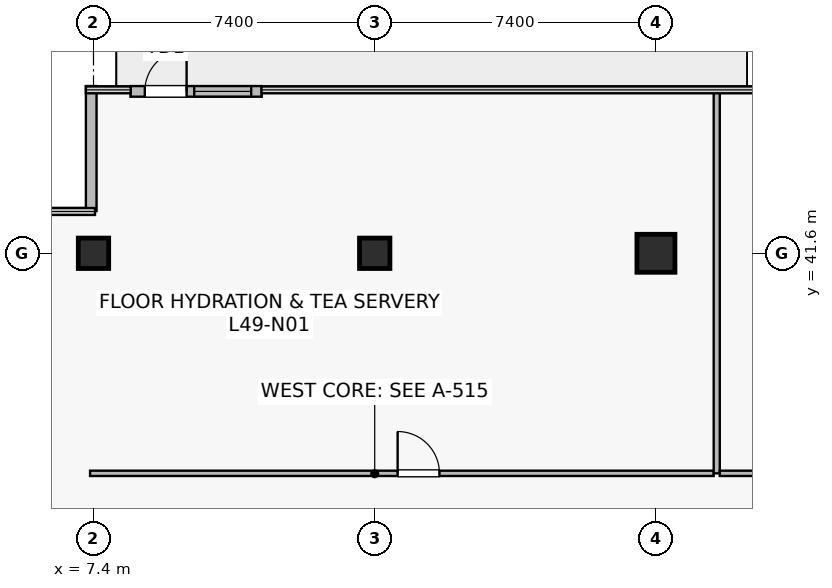
"""IFC4 building model, lengths in metres.
Left out: names, types, materials, properties, quantities, classifications, styles, units other than length and angle.
Written with IfcOpenShell. Run it as: python <this file> out.ifc"""

import sys

from ifc_helpers import new_model, si_unit, direction, frame, frame_2d, origin, origin_2d, place, context, subcontext, project, spatial, rectangle, extrude, source, transform, mapped, element, fill, save


model = new_model("IFC4")
c1 = context("Model", 3, precision=1e-05, world=origin(), true_north=direction((0.0, 1.0)))
c2 = subcontext(c1, "Body", "Model", "MODEL_VIEW")
j1 = project(units=[si_unit("LENGTHUNIT", "METRE"), si_unit("PLANEANGLEUNIT", "RADIAN")], contexts=[c1])
p1 = place(None, origin())
s1 = spatial("IfcSite", under=j1, at=p1, CompositionType="ELEMENT")
p2 = place(p1, origin())
s2 = spatial("IfcBuilding", under=s1, at=p2, CompositionType="ELEMENT")
p3 = place(p2, frame((0.0, 0.0, 205.5)))
s3 = spatial("IfcBuildingStorey", under=s2, at=p3, CompositionType="ELEMENT", Elevation=205.5)
m1 = source(origin(), c2, "Body", "SweptSolid", [
    extrude(rectangle(XDim=0.8, YDim=0.8, at=origin_2d()), origin(), (0.0, 0.0, 1.0), 4.1),
])
p4 = place(p3, frame((14.8, 41.6, 0.0), z_axis=(0.0, 0.0, 1.0), x_axis=(1.0, 0.0, 0.0)))
e1 = element("IfcColumn", 1, at=p4, inside=s3, PredefinedType="COLUMN", context=c2, shape_type="MappedRepresentation", body=[
    mapped(m1, transform((0.0, 0.0, 0.0), scale=1.0)),
])
m2 = source(origin(), c2, "Body", "SweptSolid", [
    extrude(rectangle(XDim=1.0, YDim=1.0, at=origin_2d()), origin(), (0.0, 0.0, 1.0), 4.1),
])
p5 = place(p3, frame((22.2, 41.6, 0.0), z_axis=(0.0, 0.0, 1.0), x_axis=(1.0, 0.0, 0.0)))
e2 = element("IfcColumn", 2, at=p5, inside=s3, PredefinedType="COLUMN", context=c2, shape_type="MappedRepresentation", body=[
    mapped(m2, transform((0.0, 0.0, 0.0), scale=1.0)),
])
p6 = place(p3, frame((7.4, 41.6, 0.0), z_axis=(0.0, 0.0, 1.0), x_axis=(1.0, 0.0, 0.0)))
e3 = element("IfcColumn", 3, at=p6, inside=s3, PredefinedType="COLUMN", context=c2, shape_type="MappedRepresentation", body=[
    mapped(m1, transform((0.0, 0.0, 0.0), scale=1.0)),
])
p7 = place(p3, frame((8.372, 45.86, 0.0), z_axis=(0.0, 0.0, 1.0), x_axis=(1.0, 0.0, 0.0)))
e4 = element("IfcWall", 4, at=p7, inside=s3, PredefinedType="STANDARD", context=c2, shape_type="SweptSolid", body=[
    extrude(rectangle(XDim=3.456, YDim=0.28, at=frame_2d((1.728, 0.0))), origin(), (0.0, 0.0, 1.0), 3.8),
])
p8 = place(p7, frame((0.378, 0.0, 0.0)))
e5 = element("IfcOpeningElement", 5, at=p8, cuts=e4, PredefinedType="OPENING", context=c2, shape_type="SweptSolid", body=[
    extrude(rectangle(XDim=1.1, YDim=2.2, at=frame_2d((0.55, 1.1))), frame((0.0, 0.15, 0.0), z_axis=(0.0, -1.0, 0.0), x_axis=(1.0, 0.0, 0.0)), (0.0, 0.0, 1.0), 0.3),
])
p9 = place(p7, frame((1.678, 0.0, 0.9)))
e6 = element("IfcOpeningElement", 6, at=p9, cuts=e4, PredefinedType="OPENING", context=c2, shape_type="SweptSolid", body=[
    extrude(rectangle(XDim=1.5, YDim=2.2, at=frame_2d((0.75, 1.1))), frame((0.0, 0.15, 0.0), z_axis=(0.0, -1.0, 0.0), x_axis=(1.0, 0.0, 0.0)), (0.0, 0.0, 1.0), 0.3),
])
p10 = place(p3, frame((7.34, 46.0, 0.0), z_axis=(0.0, 0.0, 1.0), x_axis=(0.0, -1.0, 0.0)))
e7 = element("IfcWall", 7, at=p10, inside=s3, PredefinedType="STANDARD", context=c2, shape_type="SweptSolid", body=[
    extrude(rectangle(XDim=3.288, YDim=0.28, at=frame_2d((1.644, 0.0))), origin(), (0.0, 0.0, 1.0), 3.8),
])
p11 = place(p3, frame((7.31, 35.81, 0.0), z_axis=(0.0, 0.0, 1.0), x_axis=(1.0, 0.0, 0.0)))
e8 = element("IfcWall", 8, at=p11, inside=s3, PredefinedType="PARTITIONING", context=c2, shape_type="SweptSolid", body=[
    extrude(rectangle(XDim=16.41, YDim=0.14, at=frame_2d((8.205, 0.0))), origin(), (0.0, 0.0, 1.0), 3.197),
])
p12 = place(p11, frame((8.093, 0.0, 0.0)))
e9 = element("IfcOpeningElement", 9, at=p12, cuts=e8, PredefinedType="OPENING", context=c2, shape_type="SweptSolid", body=[
    extrude(rectangle(XDim=1.1, YDim=2.18, at=frame_2d((0.55, 1.09))), frame((0.0, 0.08, 0.0), z_axis=(0.0, -1.0, 0.0), x_axis=(1.0, 0.0, 0.0)), (0.0, 0.0, 1.0), 0.16),
])
p13 = place(p3, frame((23.8, 35.81, 0.0), z_axis=(0.0, 0.0, 1.0), x_axis=(0.0, 1.0, 0.0)))
e10 = element("IfcWall", 10, at=p13, inside=s3, PredefinedType="PARTITIONING", context=c2, shape_type="SweptSolid", body=[
    extrude(rectangle(XDim=10.08, YDim=0.16, at=frame_2d((5.04, 0.0))), origin(), (0.0, 0.0, 1.0), 3.135),
])
p14 = place(p3, frame((23.88, 35.81, 0.0), z_axis=(0.0, 0.0, 1.0), x_axis=(1.0, 0.0, 0.0)))
e11 = element("IfcWall", 11, at=p14, inside=s3, PredefinedType="PARTITIONING", context=c2, shape_type="SweptSolid", body=[
    extrude(rectangle(XDim=23.64, YDim=0.14, at=frame_2d((11.82, 0.0))), origin(), (0.0, 0.0, 1.0), 3.197),
])
p15 = place(p14, frame((9.304, 0.0, 0.0)))
e12 = element("IfcOpeningElement", 12, at=p15, cuts=e11, PredefinedType="OPENING", context=c2, shape_type="SweptSolid", body=[
    extrude(rectangle(XDim=1.1, YDim=2.18, at=frame_2d((0.55, 1.09))), frame((0.0, 0.08, 0.0), z_axis=(0.0, -1.0, 0.0), x_axis=(1.0, 0.0, 0.0)), (0.0, 0.0, 1.0), 0.16),
])
m3 = source(origin(), c2, "Body", "SweptSolid", [
    extrude(rectangle(XDim=1.1, YDim=2.2, at=frame_2d((0.55, 1.1))), frame((0.0, 0.025, 0.0), z_axis=(0.0, -1.0, 0.0), x_axis=(1.0, 0.0, 0.0)), (0.0, 0.0, 1.0), 0.05),
])
p16 = place(p8, origin())
e13 = element("IfcDoor", 13, at=p16, inside=s3, OperationType="SINGLE_SWING_RIGHT", PredefinedType="DOOR", context=c2, shape_type="MappedRepresentation", body=[
    mapped(m3, transform((0.0, 0.0, 0.0), scale=1.0)),
])
fill(e5, e13)
m4 = source(origin(), c2, "Body", "SweptSolid", [
    extrude(rectangle(XDim=1.5, YDim=2.2, at=frame_2d((0.75, 1.1))), frame((0.0, 0.03, 0.0), z_axis=(0.0, -1.0, 0.0), x_axis=(1.0, 0.0, 0.0)), (0.0, 0.0, 1.0), 0.06),
])
p17 = place(p9, origin())
e14 = element("IfcWindow", 14, at=p17, inside=s3, PartitioningType="SINGLE_PANEL", PredefinedType="WINDOW", context=c2, shape_type="MappedRepresentation", body=[
    mapped(m4, transform((0.0, 0.0, 0.0), scale=1.0)),
])
fill(e6, e14)
m5 = source(origin(), c2, "Body", "SweptSolid", [
    extrude(rectangle(XDim=1.1, YDim=2.18, at=frame_2d((0.55, 1.09))), frame((0.0, 0.025, 0.0), z_axis=(0.0, -1.0, 0.0), x_axis=(1.0, 0.0, 0.0)), (0.0, 0.0, 1.0), 0.05),
])
p18 = place(p12, origin())
e15 = element("IfcDoor", 15, at=p18, inside=s3, OperationType="SINGLE_SWING_LEFT", PredefinedType="DOOR", context=c2, shape_type="MappedRepresentation", body=[
    mapped(m5, transform((0.0, 0.0, 0.0), scale=1.0)),
])
fill(e9, e15)
save(model, sys.argv[1])
